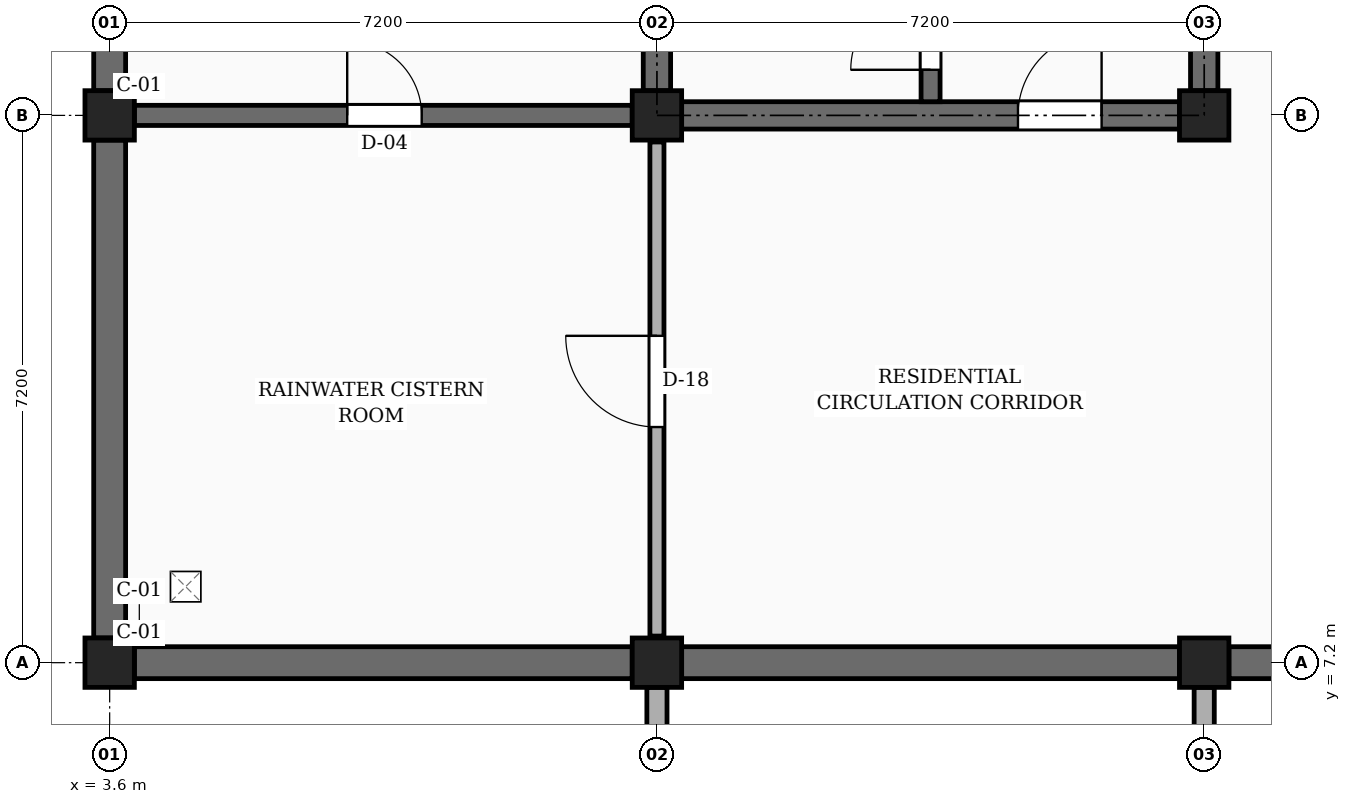
"""IFC4 building model, lengths in metres.
Left out: names, types, materials, properties, quantities, classifications, styles, units other than length and angle.
Written with IfcOpenShell. Run it as: python <this file> out.ifc"""

import sys

from ifc_helpers import new_model, si_unit, direction, frame, frame_2d, origin, origin_2d, place, context, subcontext, project, spatial, rectangle, extrude, element, fill, save


model = new_model("IFC4")
c1 = context("Model", 3, precision=1e-05, world=origin(), true_north=direction((0.0, 1.0)))
c2 = subcontext(c1, "Body", "Model", "MODEL_VIEW")
j1 = project(units=[si_unit("LENGTHUNIT", "METRE"), si_unit("PLANEANGLEUNIT", "RADIAN")], contexts=[c1])
p1 = place(None, origin())
s1 = spatial("IfcSite", under=j1, at=p1, CompositionType="ELEMENT")
p2 = place(p1, origin())
s2 = spatial("IfcBuilding", under=s1, at=p2, CompositionType="ELEMENT")
p3 = place(p2, frame((0.0, 0.0, -4.2)))
s3 = spatial("IfcBuildingStorey", under=s2, at=p3, CompositionType="ELEMENT", Elevation=-4.2)
for number, where, z_axis, x_axis in (
    (1, (18.0, 5.01, 0.0), (0.0, 0.0, 1.0), (0.0, 1.0, 0.0)),
    (2, (10.8, 6.875, 0.0), (0.0, 0.0, 1.0), (0.0, -1.0, 0.0)),
):
    element("IfcWall", number, at=place(p3, frame(where, z_axis=z_axis, x_axis=x_axis)), inside=s3, PredefinedType="SOLIDWALL", context=c2, shape_type="SweptSolid", body=[
        extrude(rectangle(XDim=1.865, YDim=0.265, at=frame_2d((0.933, 0.0))), origin(), (0.0, 0.0, 1.0), 4.12),
    ])
for number, where, z_axis, x_axis in (
    (3, (3.6, 7.2, 0.0), (0.0, 0.0, 1.0), (1.0, 0.0, 0.0)),
    (4, (3.6, 14.4, 0.0), (0.0, 0.0, 1.0), (1.0, 0.0, 0.0)),
    (5, (10.8, 7.2, 0.0), (0.0, 0.0, 1.0), (1.0, 0.0, 0.0)),
    (6, (10.8, 14.4, 0.0), (0.0, 0.0, 1.0), (1.0, 0.0, 0.0)),
    (7, (18.0, 7.2, 0.0), (0.0, 0.0, 1.0), (1.0, 0.0, 0.0)),
    (8, (18.0, 14.4, 0.0), (0.0, 0.0, 1.0), (1.0, 0.0, 0.0)),
):
    element("IfcColumn", number, at=place(p3, frame(where, z_axis=z_axis, x_axis=x_axis)), inside=s3, PredefinedType="COLUMN", context=c2, shape_type="SweptSolid", body=[
        extrude(rectangle(XDim=0.65, YDim=0.65, at=origin_2d()), origin(), (0.0, 0.0, 1.0), 4.2),
    ])
for number, where, z_axis, x_axis in (
    (9, (3.925, 7.2, 0.0), (0.0, 0.0, 1.0), (1.0, 0.0, 0.0)),
    (10, (11.125, 7.2, 0.0), (0.0, 0.0, 1.0), (1.0, 0.0, 0.0)),
    (11, (18.325, 7.2, 0.0), (0.0, 0.0, 1.0), (1.0, 0.0, 0.0)),
    (12, (3.6, 14.075, 0.0), (0.0, 0.0, 1.0), (0.0, -1.0, 0.0)),
):
    element("IfcWall", number, at=place(p3, frame(where, z_axis=z_axis, x_axis=x_axis)), inside=s3, PredefinedType="USERDEFINED", context=c2, shape_type="SweptSolid", body=[
        extrude(rectangle(XDim=6.55, YDim=0.42, at=frame_2d((3.275, 0.0))), origin(), (0.0, 0.0, 1.0), 3.03),
    ])
p4 = place(p3, frame((3.6, 21.275, 0.0), z_axis=(0.0, 0.0, 1.0), x_axis=(0.0, -1.0, 0.0)))
e13 = element("IfcWall", 13, at=p4, inside=s3, PredefinedType="USERDEFINED", context=c2, shape_type="SweptSolid", body=[
    extrude(rectangle(XDim=6.55, YDim=0.42, at=frame_2d((3.275, 0.0))), origin(), (0.0, 0.0, 1.0), 3.03),
])
p5 = place(p3, frame((3.925, 14.4, 0.0), z_axis=(0.0, 0.0, 1.0), x_axis=(1.0, 0.0, 0.0)))
e14 = element("IfcWall", 14, at=p5, inside=s3, PredefinedType="SOLIDWALL", context=c2, shape_type="SweptSolid", body=[
    extrude(rectangle(XDim=6.55, YDim=0.265, at=frame_2d((3.275, 0.0))), origin(), (0.0, 0.0, 1.0), 3.18),
])
p6 = place(p5, frame((2.8, 0.0, 0.0)))
e15 = element("IfcOpeningElement", 15, at=p6, cuts=e14, PredefinedType="OPENING", context=c2, shape_type="SweptSolid", body=[
    extrude(rectangle(XDim=0.98, YDim=2.12, at=frame_2d((0.49, 1.06))), frame((0.0, 0.143, 0.0), z_axis=(0.0, -1.0, 0.0), x_axis=(1.0, 0.0, 0.0)), (0.0, 0.0, 1.0), 0.285),
])
p7 = place(p3, frame((10.8, 14.725, 0.0), z_axis=(0.0, 0.0, 1.0), x_axis=(0.0, 1.0, 0.0)))
e16 = element("IfcWall", 16, at=p7, inside=s3, PredefinedType="SHEAR", context=c2, shape_type="SweptSolid", body=[
    extrude(rectangle(XDim=6.55, YDim=0.36, at=frame_2d((3.275, 0.0))), origin(), (0.0, 0.0, 1.0), 3.88),
])
p8 = place(p3, frame((18.0, 14.725, 0.0), z_axis=(0.0, 0.0, 1.0), x_axis=(0.0, 1.0, 0.0)))
e17 = element("IfcWall", 17, at=p8, inside=s3, PredefinedType="SHEAR", context=c2, shape_type="SweptSolid", body=[
    extrude(rectangle(XDim=6.55, YDim=0.36, at=frame_2d((3.275, 0.0))), origin(), (0.0, 0.0, 1.0), 3.88),
])
p9 = place(p8, frame((1.5, 0.0, 0.0)))
e18 = element("IfcOpeningElement", 18, at=p9, cuts=e17, PredefinedType="OPENING", context=c2, shape_type="SweptSolid", body=[
    extrude(rectangle(XDim=1.1, YDim=2.15, at=frame_2d((0.55, 1.075))), frame((0.0, 0.19, 0.0), z_axis=(0.0, -1.0, 0.0), x_axis=(1.0, 0.0, 0.0)), (0.0, 0.0, 1.0), 0.38),
])
p10 = place(p3, frame((11.125, 14.4, 0.0), z_axis=(0.0, 0.0, 1.0), x_axis=(1.0, 0.0, 0.0)))
e19 = element("IfcWall", 19, at=p10, inside=s3, PredefinedType="SHEAR", context=c2, shape_type="SweptSolid", body=[
    extrude(rectangle(XDim=6.55, YDim=0.36, at=frame_2d((3.275, 0.0))), origin(), (0.0, 0.0, 1.0), 3.88),
])
p11 = place(p10, frame((4.425, 0.0, 0.0)))
e20 = element("IfcOpeningElement", 20, at=p11, cuts=e19, PredefinedType="OPENING", context=c2, shape_type="SweptSolid", body=[
    extrude(rectangle(XDim=1.1, YDim=2.15, at=frame_2d((0.55, 1.075))), frame((0.0, 0.19, 0.0), z_axis=(0.0, -1.0, 0.0), x_axis=(1.0, 0.0, 0.0)), (0.0, 0.0, 1.0), 0.38),
])
p12 = place(p3, frame((14.4, 14.58, 0.0), z_axis=(0.0, 0.0, 1.0), x_axis=(0.0, 1.0, 0.0)))
e21 = element("IfcWall", 21, at=p12, inside=s3, PredefinedType="SHEAR", context=c2, shape_type="SweptSolid", body=[
    extrude(rectangle(XDim=6.84, YDim=0.25, at=frame_2d((3.42, 0.0))), origin(), (0.0, 0.0, 1.0), 3.88),
])
p13 = place(p12, frame((0.42, 0.0, 0.0)))
e22 = element("IfcOpeningElement", 22, at=p13, cuts=e21, PredefinedType="OPENING", context=c2, shape_type="SweptSolid", body=[
    extrude(rectangle(XDim=1.05, YDim=2.15, at=frame_2d((0.525, 1.075))), frame((0.0, 0.135, 0.0), z_axis=(0.0, -1.0, 0.0), x_axis=(1.0, 0.0, 0.0)), (0.0, 0.0, 1.0), 0.27),
])
p14 = place(p3, frame((10.8, 7.55, 0.0), z_axis=(0.0, 0.0, 1.0), x_axis=(0.0, 1.0, 0.0)))
e23 = element("IfcWall", 23, at=p14, inside=s3, PredefinedType="PARTITIONING", context=c2, shape_type="SweptSolid", body=[
    extrude(rectangle(XDim=6.5, YDim=0.185, at=frame_2d((3.25, 0.0))), origin(), (0.0, 0.0, 1.0), 3.08),
])
p15 = place(p14, frame((2.75, 0.0, 0.0)))
e24 = element("IfcOpeningElement", 24, at=p15, cuts=e23, PredefinedType="OPENING", context=c2, shape_type="SweptSolid", body=[
    extrude(rectangle(XDim=1.2, YDim=2.2, at=frame_2d((0.6, 1.1))), frame((0.0, 0.103, 0.0), z_axis=(0.0, -1.0, 0.0), x_axis=(1.0, 0.0, 0.0)), (0.0, 0.0, 1.0), 0.205),
])
p16 = place(p11, frame((1.1, 0.0, 0.0), z_axis=(0.0, 0.0, 1.0), x_axis=(-1.0, 0.0, 0.0)))
e25 = element("IfcDoor", 25, at=p16, inside=s3, OperationType="SINGLE_SWING_RIGHT", PredefinedType="DOOR", context=c2, shape_type="SweptSolid", body=[
    extrude(rectangle(XDim=1.1, YDim=2.15, at=frame_2d((0.55, 1.075))), frame((0.0, 0.025, 0.0), z_axis=(0.0, -1.0, 0.0), x_axis=(1.0, 0.0, 0.0)), (0.0, 0.0, 1.0), 0.05),
])
fill(e20, e25)
p17 = place(p13, origin())
e26 = element("IfcDoor", 26, at=p17, inside=s3, OperationType="SINGLE_SWING_LEFT", PredefinedType="DOOR", context=c2, shape_type="SweptSolid", body=[
    extrude(rectangle(XDim=1.05, YDim=2.15, at=frame_2d((0.525, 1.075))), frame((0.0, 0.025, 0.0), z_axis=(0.0, -1.0, 0.0), x_axis=(1.0, 0.0, 0.0)), (0.0, 0.0, 1.0), 0.05),
])
fill(e22, e26)
p18 = place(p15, origin())
e27 = element("IfcDoor", 27, at=p18, inside=s3, OperationType="SINGLE_SWING_RIGHT", PredefinedType="DOOR", context=c2, shape_type="SweptSolid", body=[
    extrude(rectangle(XDim=1.2, YDim=2.2, at=frame_2d((0.6, 1.1))), frame((0.0, 0.025, 0.0), z_axis=(0.0, -1.0, 0.0), x_axis=(1.0, 0.0, 0.0)), (0.0, 0.0, 1.0), 0.05),
])
fill(e24, e27)
p19 = place(p6, origin())
e28 = element("IfcDoor", 28, at=p19, inside=s3, OperationType="SINGLE_SWING_LEFT", PredefinedType="DOOR", context=c2, shape_type="SweptSolid", body=[
    extrude(rectangle(XDim=0.98, YDim=2.12, at=frame_2d((0.49, 1.06))), frame((0.0, 0.025, 0.0), z_axis=(0.0, -1.0, 0.0), x_axis=(1.0, 0.0, 0.0)), (0.0, 0.0, 1.0), 0.05),
])
fill(e15, e28)
save(model, sys.argv[1])
